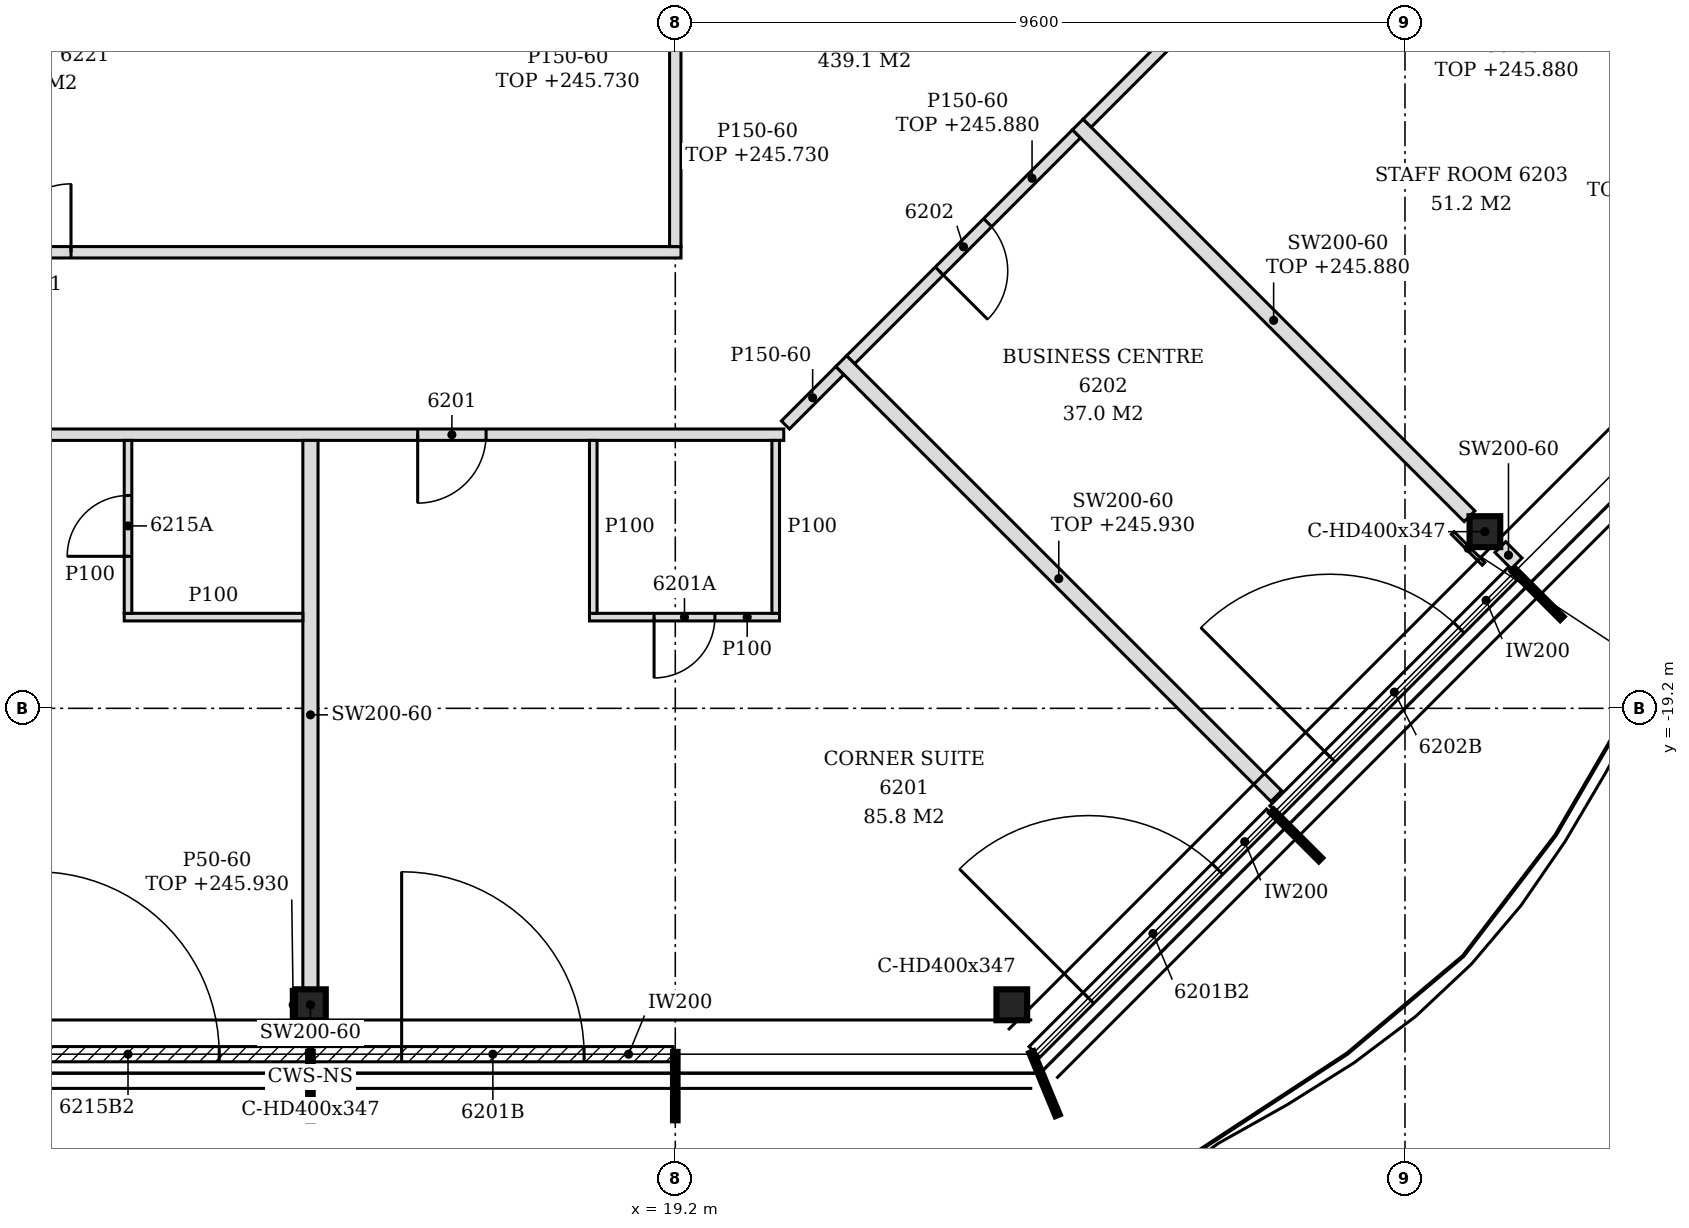
"""IFC4 building model, lengths in metres.
Left out: names, types, materials, properties, quantities, classifications, styles, units other than length and angle.
Written with IfcOpenShell. Run it as: python <this file> out.ifc"""

import sys

from ifc_helpers import new_model, si_unit, direction, frame, frame_2d, origin, origin_2d, place, context, subcontext, project, spatial, polyline, rectangle, i_section, outline, extrude, element, fill, save


model = new_model("IFC4")
c1 = context("Model", 3, precision=1e-05, world=origin(), true_north=direction((0.0, 1.0)))
c2 = subcontext(c1, "Body", "Model", "MODEL_VIEW")
j1 = project(units=[si_unit("LENGTHUNIT", "METRE"), si_unit("PLANEANGLEUNIT", "RADIAN")], contexts=[c1])
p1 = place(None, origin())
s1 = spatial("IfcSite", under=j1, at=p1, CompositionType="ELEMENT")
p2 = place(p1, origin())
s2 = spatial("IfcBuilding", under=s1, at=p2, CompositionType="ELEMENT")
p3 = place(p2, frame((0.0, 0.0, 243.0)))
s3 = spatial("IfcBuildingStorey", under=s2, at=p3, CompositionType="ELEMENT", Elevation=243.0)
for number, where, z_axis, x_axis in (
    (1, (14.4, -23.1, -0.15), (0.0, 0.0, 1.0), (1.0, 0.0, 0.0)),
    (2, (23.627, -23.1, -0.15), (0.0, 0.0, 1.0), (1.0, 0.0, 0.0)),
    (3, (29.852, -16.876, -0.15), (0.0, 0.0, 1.0), (1.0, 0.0, 0.0)),
):
    element("IfcColumn", number, at=place(p3, frame(where, z_axis=z_axis, x_axis=x_axis)), inside=s3, PredefinedType="COLUMN", context=c2, shape_type="SweptSolid", body=[
        extrude(i_section(OverallWidth=0.404, OverallDepth=0.407, WebThickness=0.027, FlangeThickness=0.044, FilletRadius=0.015, at=origin_2d()), origin(), (0.0, 0.0, 1.0), 3.6),
    ])
p4 = place(p3, frame((9.63, -23.75, 0.0), z_axis=(0.0, 0.0, 1.0), x_axis=(1.0, 0.0, 0.0)))
e4 = element("IfcWall", 4, at=p4, inside=s3, PredefinedType="NOTDEFINED", context=c2, shape_type="SweptSolid", body=[
    extrude(rectangle(XDim=4.74, YDim=0.2, at=frame_2d((2.37, 0.0))), origin(), (0.0, 0.0, 1.0), 3.45),
])
p5 = place(p4, frame((1.17, 0.0, 0.0)))
e5 = element("IfcOpeningElement", 5, at=p5, cuts=e4, PredefinedType="OPENING", context=c2, shape_type="SweptSolid", body=[
    extrude(rectangle(XDim=2.4, YDim=2.4, at=frame_2d((1.2, 1.2))), frame((0.0, 0.11, 0.0), z_axis=(0.0, -1.0, 0.0), x_axis=(1.0, 0.0, 0.0)), (0.0, 0.0, 1.0), 0.22),
])
p6 = place(p3, frame((14.43, -23.75, 0.0), z_axis=(0.0, 0.0, 1.0), x_axis=(1.0, 0.0, 0.0)))
e6 = element("IfcWall", 6, at=p6, inside=s3, PredefinedType="NOTDEFINED", context=c2, shape_type="SweptSolid", body=[
    extrude(rectangle(XDim=4.74, YDim=0.2, at=frame_2d((2.37, 0.0))), origin(), (0.0, 0.0, 1.0), 3.45),
])
p7 = place(p6, frame((1.17, 0.0, 0.0)))
e7 = element("IfcOpeningElement", 7, at=p7, cuts=e6, PredefinedType="OPENING", context=c2, shape_type="SweptSolid", body=[
    extrude(rectangle(XDim=2.4, YDim=2.4, at=frame_2d((1.2, 1.2))), frame((0.0, 0.11, 0.0), z_axis=(0.0, -1.0, 0.0), x_axis=(1.0, 0.0, 0.0)), (0.0, 0.0, 1.0), 0.22),
])
p8 = place(p3, frame((23.925, -23.722, 0.0), z_axis=(0.0, 0.0, 1.0), x_axis=(0.707106781187, 0.707106781187, 0.0)))
e8 = element("IfcWall", 8, at=p8, inside=s3, PredefinedType="NOTDEFINED", context=c2, shape_type="SweptSolid", body=[
    extrude(rectangle(XDim=4.421, YDim=0.2, at=frame_2d((2.21, 0.0))), origin(), (0.0, 0.0, 1.0), 3.45),
])
p9 = place(p8, frame((1.005, 0.0, 0.0)))
e9 = element("IfcOpeningElement", 9, at=p9, cuts=e8, PredefinedType="OPENING", context=c2, shape_type="SweptSolid", body=[
    extrude(rectangle(XDim=2.4, YDim=2.4, at=frame_2d((1.2, 1.2))), frame((0.0, 0.11, 0.0), z_axis=(0.0, -1.0, 0.0), x_axis=(1.0, 0.0, 0.0)), (0.0, 0.0, 1.0), 0.22),
])
p10 = place(p3, frame((27.093, -20.553, 0.0), z_axis=(0.0, 0.0, 1.0), x_axis=(0.707079231393, 0.707134329907, 0.0)))
e10 = element("IfcWall", 10, at=p10, inside=s3, PredefinedType="NOTDEFINED", context=c2, shape_type="SweptSolid", body=[
    extrude(rectangle(XDim=4.431, YDim=0.2, at=frame_2d((2.215, 0.0))), origin(), (0.0, 0.0, 1.0), 3.45),
])
p11 = place(p10, frame((1.015, 0.0, 0.0)))
e11 = element("IfcOpeningElement", 11, at=p11, cuts=e10, PredefinedType="OPENING", context=c2, shape_type="SweptSolid", body=[
    extrude(rectangle(XDim=2.4, YDim=2.4, at=frame_2d((1.2, 1.2))), frame((0.0, 0.11, 0.0), z_axis=(0.0, -1.0, 0.0), x_axis=(1.0, 0.0, 0.0)), (0.0, 0.0, 1.0), 0.22),
])
p12 = place(p3, frame((14.4, -23.65, 0.0), z_axis=(0.0, 0.0, 1.0), x_axis=(0.0, 1.0, 0.0)))
e12 = element("IfcWall", 12, at=p12, inside=s3, PredefinedType="PARTITIONING", context=c2, shape_type="SweptSolid", body=[
    extrude(rectangle(XDim=0.346, YDim=0.2, at=frame_2d((0.173, 0.0))), origin(), (0.0, 0.0, 1.0), 3.45),
])
p13 = place(p3, frame((14.4, -22.896, 0.0), z_axis=(0.0, 0.0, 1.0), x_axis=(0.0, 1.0, 0.0)))
e13 = element("IfcWall", 13, at=p13, inside=s3, PredefinedType="PARTITIONING", context=c2, shape_type="SweptSolid", body=[
    extrude(outline(polyline([(0.0, 0.0), (7.221, 0.0), (7.221, 3.45), (3.802, 3.45), (3.8, 2.88), (3.592, 2.88), (3.59, 3.45), (0.0, 3.45), (0.0, 0.0)])), frame((0.0, 0.1, 0.0), z_axis=(0.0, -1.0, 0.0), x_axis=(1.0, 0.0, 0.0)), (0.0, 0.0, 1.0), 0.2),
])
p14 = place(p3, frame((27.107, -20.355, 0.0), z_axis=(0.0, 0.0, 1.0), x_axis=(-0.707182179369, 0.707031374964, 0.0)))
e14 = element("IfcWall", 14, at=p14, inside=s3, PredefinedType="PARTITIONING", context=c2, shape_type="SweptSolid", body=[
    extrude(rectangle(XDim=8.095, YDim=0.2, at=frame_2d((4.047, 0.0))), origin(), (0.0, 0.0, 1.0), 2.93),
])
p15 = place(p3, frame((11.95, -18.0, 0.0), z_axis=(0.0, 0.0, 1.0), x_axis=(1.0, 0.0, 0.0)))
e15 = element("IfcWall", 15, at=p15, inside=s3, PredefinedType="PARTITIONING", context=c2, shape_type="SweptSolid", body=[
    extrude(rectangle(XDim=2.35, YDim=0.1, at=frame_2d((1.175, 0.0))), origin(), (0.0, 0.0, 1.0), 3.45),
])
p16 = place(p3, frame((18.071, -18.0, 0.0), z_axis=(0.0, 0.0, 1.0), x_axis=(1.0, 0.0, 0.0)))
e16 = element("IfcWall", 16, at=p16, inside=s3, PredefinedType="PARTITIONING", context=c2, shape_type="SweptSolid", body=[
    extrude(outline(polyline([(0.0, 0.0), (2.5, 0.0), (2.5, 3.45), (1.279, 3.45), (1.277, 2.73), (0.979, 2.73), (0.977, 3.45), (0.0, 3.45), (0.0, 0.0)])), frame((0.0, 0.05, 0.0), z_axis=(0.0, -1.0, 0.0), x_axis=(1.0, 0.0, 0.0)), (0.0, 0.0, 1.0), 0.1),
])
p17 = place(p16, frame((0.85, 0.0, 0.0)))
e17 = element("IfcOpeningElement", 17, at=p17, cuts=e16, PredefinedType="OPENING", context=c2, shape_type="SweptSolid", body=[
    extrude(rectangle(XDim=0.8, YDim=2.1, at=frame_2d((0.4, 1.05))), frame((0.0, 0.06, 0.0), z_axis=(0.0, -1.0, 0.0), x_axis=(1.0, 0.0, 0.0)), (0.0, 0.0, 1.0), 0.12),
])
p18 = place(p3, frame((12.0, -17.95, 0.0), z_axis=(0.0, 0.0, 1.0), x_axis=(0.0, 1.0, 0.0)))
e18 = element("IfcWall", 18, at=p18, inside=s3, PredefinedType="PARTITIONING", context=c2, shape_type="SweptSolid", body=[
    extrude(rectangle(XDim=2.275, YDim=0.1, at=frame_2d((1.137, 0.0))), origin(), (0.0, 0.0, 1.0), 3.45),
])
p19 = place(p18, frame((0.75, 0.0, 0.0)))
e19 = element("IfcOpeningElement", 19, at=p19, cuts=e18, PredefinedType="OPENING", context=c2, shape_type="SweptSolid", body=[
    extrude(rectangle(XDim=0.8, YDim=2.1, at=frame_2d((0.4, 1.05))), frame((0.0, 0.06, 0.0), z_axis=(0.0, -1.0, 0.0), x_axis=(1.0, 0.0, 0.0)), (0.0, 0.0, 1.0), 0.12),
])
for number, where, z_axis, x_axis in (
    (20, (18.121, -17.95, 0.0), (0.0, 0.0, 1.0), (0.0, 1.0, 0.0)),
    (21, (20.521, -17.95, 0.0), (0.0, 0.0, 1.0), (0.0, 1.0, 0.0)),
):
    element("IfcWall", number, at=place(p3, frame(where, z_axis=z_axis, x_axis=x_axis)), inside=s3, PredefinedType="PARTITIONING", context=c2, shape_type="SweptSolid", body=[
        extrude(rectangle(XDim=2.275, YDim=0.1, at=frame_2d((1.137, 0.0))), origin(), (0.0, 0.0, 1.0), 3.45),
    ])
p20 = place(p3, frame((30.269, -17.293, 0.0), z_axis=(0.0, 0.0, 1.0), x_axis=(-0.707509117806, 0.706704215511, 0.0)))
e22 = element("IfcWall", 22, at=p20, inside=s3, PredefinedType="PARTITIONING", context=c2, shape_type="SweptSolid", body=[
    extrude(rectangle(XDim=0.303, YDim=0.2, at=frame_2d((0.152, 0.0))), origin(), (0.0, 0.0, 1.0), 3.45),
])
p21 = place(p3, frame((29.649, -16.673, 0.0), z_axis=(0.0, 0.0, 1.0), x_axis=(-0.707106781187, 0.707106781187, 0.0)))
e23 = element("IfcWall", 23, at=p21, inside=s3, PredefinedType="PARTITIONING", context=c2, shape_type="SweptSolid", body=[
    extrude(rectangle(XDim=7.289, YDim=0.2, at=frame_2d((3.644, 0.0))), origin(), (0.0, 0.0, 1.0), 2.88),
])
p22 = place(p3, frame((-3.126, -15.6, 0.0), z_axis=(0.0, 0.0, 1.0), x_axis=(1.0, 0.0, 0.0)))
e24 = element("IfcWall", 24, at=p22, inside=s3, PredefinedType="PARTITIONING", context=c2, shape_type="SweptSolid", body=[
    extrude(outline(polyline([(0.0, 0.0), (23.753, 0.0), (23.753, 3.45), (22.476, 3.45), (22.474, 2.73), (22.176, 2.73), (22.174, 3.45), (10.476, 3.45), (10.474, 2.73), (10.176, 2.73), (10.174, 3.45), (1.369, 3.45), (1.367, 2.63), (0.229, 2.63), (0.227, 3.45), (0.0, 3.45), (0.0, 0.0)])), frame((0.0, 0.075, 0.0), z_axis=(0.0, -1.0, 0.0), x_axis=(1.0, 0.0, 0.0)), (0.0, 0.0, 1.0), 0.15),
])
p23 = place(p22, frame((18.937, 0.0, 0.0)))
e25 = element("IfcOpeningElement", 25, at=p23, cuts=e24, PredefinedType="OPENING", context=c2, shape_type="SweptSolid", body=[
    extrude(rectangle(XDim=0.9, YDim=2.1, at=frame_2d((0.45, 1.05))), frame((0.0, 0.085, 0.0), z_axis=(0.0, -1.0, 0.0), x_axis=(1.0, 0.0, 0.0)), (0.0, 0.0, 1.0), 0.17),
])
p24 = place(p22, frame((6.876, 0.0, 0.0)))
e26 = element("IfcOpeningElement", 26, at=p24, cuts=e24, PredefinedType="OPENING", context=c2, shape_type="SweptSolid", body=[
    extrude(rectangle(XDim=0.9, YDim=2.1, at=frame_2d((0.45, 1.05))), frame((0.0, 0.085, 0.0), z_axis=(0.0, -1.0, 0.0), x_axis=(1.0, 0.0, 0.0)), (0.0, 0.0, 1.0), 0.17),
])
p25 = place(p3, frame((20.649, -15.472, 0.0), z_axis=(0.0, 0.0, 1.0), x_axis=(0.707106781187, 0.707106781187, 0.0)))
e27 = element("IfcWall", 27, at=p25, inside=s3, PredefinedType="PARTITIONING", context=c2, shape_type="SweptSolid", body=[
    extrude(rectangle(XDim=1.013, YDim=0.15, at=frame_2d((0.506, 0.0))), origin(), (0.0, 0.0, 1.0), 3.45),
])
p26 = place(p3, frame((21.507, -14.614, 0.0), z_axis=(0.0, 0.0, 1.0), x_axis=(0.706990566745, 0.707222976531, 0.0)))
e28 = element("IfcWall", 28, at=p26, inside=s3, PredefinedType="PARTITIONING", context=c2, shape_type="SweptSolid", body=[
    extrude(rectangle(XDim=4.202, YDim=0.15, at=frame_2d((2.101, 0.0))), origin(), (0.0, 0.0, 1.0), 2.88),
])
p27 = place(p26, frame((1.651, 0.0, 0.0)))
e29 = element("IfcOpeningElement", 29, at=p27, cuts=e28, PredefinedType="OPENING", context=c2, shape_type="SweptSolid", body=[
    extrude(rectangle(XDim=0.9, YDim=2.1, at=frame_2d((0.45, 1.05))), frame((0.0, 0.085, 0.0), z_axis=(0.0, -1.0, 0.0), x_axis=(1.0, 0.0, 0.0)), (0.0, 0.0, 1.0), 0.17),
])
p28 = place(p3, frame((2.325, -13.2, 0.0), z_axis=(0.0, 0.0, 1.0), x_axis=(1.0, 0.0, 0.0)))
e30 = element("IfcWall", 30, at=p28, inside=s3, PredefinedType="PARTITIONING", context=c2, shape_type="SweptSolid", body=[
    extrude(outline(polyline([(0.0, 0.0), (16.95, 0.0), (16.95, 2.73), (16.725, 2.73), (16.723, 3.45), (5.025, 3.45), (5.023, 2.73), (4.725, 2.73), (4.723, 3.45), (0.0, 3.45), (0.0, 0.0)])), frame((0.0, 0.075, 0.0), z_axis=(0.0, -1.0, 0.0), x_axis=(1.0, 0.0, 0.0)), (0.0, 0.0, 1.0), 0.15),
])
p29 = place(p28, frame((8.025, 0.0, 0.0)))
e31 = element("IfcOpeningElement", 31, at=p29, cuts=e30, PredefinedType="OPENING", context=c2, shape_type="SweptSolid", body=[
    extrude(rectangle(XDim=0.9, YDim=2.1, at=frame_2d((0.45, 1.05))), frame((0.0, 0.085, 0.0), z_axis=(0.0, -1.0, 0.0), x_axis=(1.0, 0.0, 0.0)), (0.0, 0.0, 1.0), 0.17),
])
p30 = place(p3, frame((19.2, -13.125, 0.0), z_axis=(0.0, 0.0, 1.0), x_axis=(0.0, 1.0, 0.0)))
e32 = element("IfcWall", 32, at=p30, inside=s3, PredefinedType="PARTITIONING", context=c2, shape_type="SweptSolid", body=[
    extrude(rectangle(XDim=2.71, YDim=0.15, at=frame_2d((1.355, 0.0))), origin(), (0.0, 0.0, 1.0), 2.73),
])
p31 = place(p3, frame((34.581, -12.981, 0.0), z_axis=(0.0, 0.0, 1.0), x_axis=(-0.707133900936, 0.707079660397, 0.0)))
e33 = element("IfcWall", 33, at=p31, inside=s3, PredefinedType="PARTITIONING", context=c2, shape_type="SweptSolid", body=[
    extrude(rectangle(XDim=4.501, YDim=0.2, at=frame_2d((2.25, 0.0))), origin(), (0.0, 0.0, 1.0), 2.63),
])
p32 = place(p3, frame((24.619, -11.501, 0.0), z_axis=(0.0, 0.0, 1.0), x_axis=(0.707106781187, 0.707106781187, 0.0)))
e34 = element("IfcWall", 34, at=p32, inside=s3, PredefinedType="PARTITIONING", context=c2, shape_type="SweptSolid", body=[
    extrude(rectangle(XDim=8.702, YDim=0.15, at=frame_2d((4.351, 0.0))), origin(), (0.0, 0.0, 1.0), 2.88),
])
p33 = place(p32, frame((2.499, 0.0, 0.0)))
e35 = element("IfcOpeningElement", 35, at=p33, cuts=e34, PredefinedType="OPENING", context=c2, shape_type="SweptSolid", body=[
    extrude(rectangle(XDim=0.9, YDim=2.1, at=frame_2d((0.45, 1.05))), frame((0.0, 0.085, 0.0), z_axis=(0.0, -1.0, 0.0), x_axis=(1.0, 0.0, 0.0)), (0.0, 0.0, 1.0), 0.17),
])
p34 = place(p32, frame((6.9, 0.0, 0.0)))
e36 = element("IfcOpeningElement", 36, at=p34, cuts=e34, PredefinedType="OPENING", context=c2, shape_type="SweptSolid", body=[
    extrude(rectangle(XDim=0.9, YDim=2.1, at=frame_2d((0.45, 1.05))), frame((0.0, 0.085, 0.0), z_axis=(0.0, -1.0, 0.0), x_axis=(1.0, 0.0, 0.0)), (0.0, 0.0, 1.0), 0.17),
])
p35 = place(p3, frame((14.173, -23.303, 0.0), z_axis=(0.0, 0.0, 1.0), x_axis=(0.0, 1.0, 0.0)))
e37 = element("IfcWall", 37, at=p35, inside=s3, PredefinedType="PARTITIONING", context=c2, shape_type="SweptSolid", body=[
    extrude(rectangle(XDim=0.407, YDim=0.05, at=frame_2d((0.204, 0.0))), origin(), (0.0, 0.0, 1.0), 2.93),
])
p36 = place(p3, frame((29.834, -17.299, 0.0), z_axis=(0.0, 0.0, 1.0), x_axis=(-0.707106781187, 0.707106781187, 0.0)))
e38 = element("IfcWall", 38, at=p36, inside=s3, PredefinedType="PARTITIONING", context=c2, shape_type="SweptSolid", body=[
    extrude(rectangle(XDim=0.573, YDim=0.05, at=frame_2d((0.287, 0.0))), origin(), (0.0, 0.0, 1.0), 2.93),
])
p37 = place(p5, origin())
e39 = element("IfcDoor", 39, at=p37, inside=s3, OperationType="SINGLE_SWING_LEFT", PredefinedType="DOOR", context=c2, shape_type="SweptSolid", body=[
    extrude(rectangle(XDim=2.4, YDim=2.4, at=frame_2d((1.2, 1.2))), frame((0.0, 0.025, 0.0), z_axis=(0.0, -1.0, 0.0), x_axis=(1.0, 0.0, 0.0)), (0.0, 0.0, 1.0), 0.05),
])
fill(e5, e39)
p38 = place(p7, origin())
e40 = element("IfcDoor", 40, at=p38, inside=s3, OperationType="SINGLE_SWING_LEFT", PredefinedType="DOOR", context=c2, shape_type="SweptSolid", body=[
    extrude(rectangle(XDim=2.4, YDim=2.4, at=frame_2d((1.2, 1.2))), frame((0.0, 0.025, 0.0), z_axis=(0.0, -1.0, 0.0), x_axis=(1.0, 0.0, 0.0)), (0.0, 0.0, 1.0), 0.05),
])
fill(e7, e40)
p39 = place(p9, origin())
e41 = element("IfcDoor", 41, at=p39, inside=s3, OperationType="SINGLE_SWING_LEFT", PredefinedType="DOOR", context=c2, shape_type="SweptSolid", body=[
    extrude(rectangle(XDim=2.4, YDim=2.4, at=frame_2d((1.2, 1.2))), frame((0.0, 0.025, 0.0), z_axis=(0.0, -1.0, 0.0), x_axis=(1.0, 0.0, 0.0)), (0.0, 0.0, 1.0), 0.05),
])
fill(e9, e41)
p40 = place(p11, origin())
e42 = element("IfcDoor", 42, at=p40, inside=s3, OperationType="SINGLE_SWING_LEFT", PredefinedType="DOOR", context=c2, shape_type="SweptSolid", body=[
    extrude(rectangle(XDim=2.4, YDim=2.4, at=frame_2d((1.2, 1.2))), frame((0.0, 0.025, 0.0), z_axis=(0.0, -1.0, 0.0), x_axis=(1.0, 0.0, 0.0)), (0.0, 0.0, 1.0), 0.05),
])
fill(e11, e42)
p41 = place(p23, frame((0.9, 0.0, 0.0), z_axis=(0.0, 0.0, 1.0), x_axis=(-1.0, 0.0, 0.0)))
e43 = element("IfcDoor", 43, at=p41, inside=s3, OperationType="SINGLE_SWING_RIGHT", PredefinedType="DOOR", context=c2, shape_type="SweptSolid", body=[
    extrude(rectangle(XDim=0.9, YDim=2.1, at=frame_2d((0.45, 1.05))), frame((0.0, 0.025, 0.0), z_axis=(0.0, -1.0, 0.0), x_axis=(1.0, 0.0, 0.0)), (0.0, 0.0, 1.0), 0.05),
])
fill(e25, e43)
p42 = place(p17, frame((0.8, 0.0, 0.0), z_axis=(0.0, 0.0, 1.0), x_axis=(-1.0, 0.0, 0.0)))
e44 = element("IfcDoor", 44, at=p42, inside=s3, OperationType="SINGLE_SWING_RIGHT", PredefinedType="DOOR", context=c2, shape_type="SweptSolid", body=[
    extrude(rectangle(XDim=0.8, YDim=2.1, at=frame_2d((0.4, 1.05))), frame((0.0, 0.025, 0.0), z_axis=(0.0, -1.0, 0.0), x_axis=(1.0, 0.0, 0.0)), (0.0, 0.0, 1.0), 0.05),
])
fill(e17, e44)
p43 = place(p27, frame((0.9, 0.0, 0.0), z_axis=(0.0, 0.0, 1.0), x_axis=(-1.0, 0.0, 0.0)))
e45 = element("IfcDoor", 45, at=p43, inside=s3, OperationType="SINGLE_SWING_RIGHT", PredefinedType="DOOR", context=c2, shape_type="SweptSolid", body=[
    extrude(rectangle(XDim=0.9, YDim=2.1, at=frame_2d((0.45, 1.05))), frame((0.0, 0.025, 0.0), z_axis=(0.0, -1.0, 0.0), x_axis=(1.0, 0.0, 0.0)), (0.0, 0.0, 1.0), 0.05),
])
fill(e29, e45)
p44 = place(p19, origin())
e46 = element("IfcDoor", 46, at=p44, inside=s3, OperationType="SINGLE_SWING_LEFT", PredefinedType="DOOR", context=c2, shape_type="SweptSolid", body=[
    extrude(rectangle(XDim=0.8, YDim=2.1, at=frame_2d((0.4, 1.05))), frame((0.0, 0.025, 0.0), z_axis=(0.0, -1.0, 0.0), x_axis=(1.0, 0.0, 0.0)), (0.0, 0.0, 1.0), 0.05),
])
fill(e19, e46)
p45 = place(p29, origin())
e47 = element("IfcDoor", 47, at=p45, inside=s3, OperationType="SINGLE_SWING_RIGHT", PredefinedType="DOOR", context=c2, shape_type="SweptSolid", body=[
    extrude(rectangle(XDim=0.9, YDim=2.1, at=frame_2d((0.45, 1.05))), frame((0.0, 0.025, 0.0), z_axis=(0.0, -1.0, 0.0), x_axis=(1.0, 0.0, 0.0)), (0.0, 0.0, 1.0), 0.05),
])
fill(e31, e47)
save(model, sys.argv[1])
